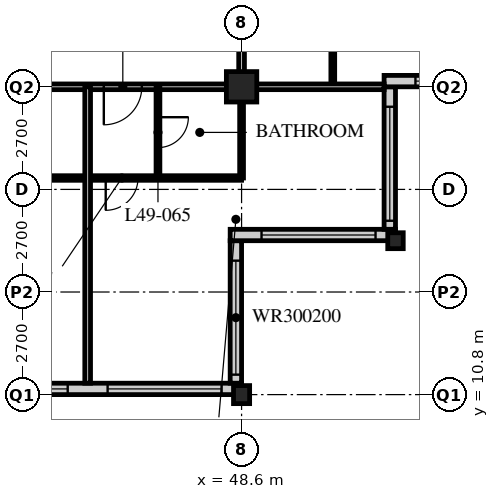
"""IFC4 building model, lengths in metres.
Left out: names, types, materials, properties, quantities, classifications, styles, units other than length and angle.
Written with IfcOpenShell. Run it as: python <this file> out.ifc"""

import sys

from ifc_helpers import new_model, si_unit, direction, frame, frame_2d, origin, origin_2d, place, context, subcontext, project, spatial, rectangle, hollow_rectangle, i_section, extrude, element, fill, save


model = new_model("IFC4")
c1 = context("Model", 3, precision=1e-05, world=origin(), true_north=direction((0.0, 1.0)))
c2 = subcontext(c1, "Body", "Model", "MODEL_VIEW")
j1 = project(units=[si_unit("LENGTHUNIT", "METRE"), si_unit("PLANEANGLEUNIT", "RADIAN")], contexts=[c1])
p1 = place(None, origin())
s1 = spatial("IfcSite", under=j1, at=p1, CompositionType="ELEMENT")
p2 = place(p1, origin())
s2 = spatial("IfcBuilding", under=s1, at=p2, CompositionType="ELEMENT")
p3 = place(p2, frame((0.0, 0.0, 192.0)))
s3 = spatial("IfcBuildingStorey", under=s2, at=p3, CompositionType="ELEMENT", Elevation=192.0)
p4 = place(p3, frame((48.6, 10.8, 0.0), z_axis=(0.0, 0.0, 1.0), x_axis=(1.0, 0.0, 0.0)))
e1 = element("IfcColumn", 1, at=p4, inside=s3, PredefinedType="COLUMN", context=c2, shape_type="SweptSolid", body=[
    extrude(i_section(OverallWidth=0.424, OverallDepth=0.475, WebThickness=0.048, FlangeThickness=0.077, FilletRadius=0.015, at=origin_2d()), origin(), (0.0, 0.0, 1.0), 3.6),
])
p5 = place(p3, frame((48.6, 18.9, 0.0), z_axis=(0.0, 0.0, 1.0), x_axis=(1.0, 0.0, 0.0)))
e2 = element("IfcColumn", 2, at=p5, inside=s3, PredefinedType="COLUMN", context=c2, shape_type="SweptSolid", body=[
    extrude(hollow_rectangle(XDim=0.8, YDim=0.8, WallThickness=0.08, at=origin_2d()), origin(), (0.0, 0.0, 1.0), 3.6),
])
p6 = place(p3, frame((52.65, 14.85, 0.0), z_axis=(0.0, 0.0, 1.0), x_axis=(1.0, 0.0, 0.0)))
e3 = element("IfcColumn", 3, at=p6, inside=s3, PredefinedType="COLUMN", context=c2, shape_type="SweptSolid", body=[
    extrude(i_section(OverallWidth=0.407, OverallDepth=0.419, WebThickness=0.031, FlangeThickness=0.049, FilletRadius=0.015, at=origin_2d()), origin(), (0.0, 0.0, 1.0), 3.6),
])
p7 = place(p3, frame((8.4, 10.95, 0.0), z_axis=(0.0, 0.0, 1.0), x_axis=(1.0, 0.0, 0.0)))
e4 = element("IfcWall", 4, at=p7, inside=s3, PredefinedType="SOLIDWALL", context=c2, shape_type="SweptSolid", body=[
    extrude(rectangle(XDim=40.2, YDim=0.3, at=frame_2d((20.1, 0.0))), origin(), (0.0, 0.0, 1.0), 3.39),
])
p8 = place(p7, frame((0.225, 0.0, 0.6)))
e5 = element("IfcOpeningElement", 5, at=p8, cuts=e4, PredefinedType="OPENING", context=c2, shape_type="SweptSolid", body=[
    extrude(rectangle(XDim=3.0, YDim=2.4, at=frame_2d((1.5, 1.2))), frame((0.0, 0.16, 0.0), z_axis=(0.0, -1.0, 0.0), x_axis=(1.0, 0.0, 0.0)), (0.0, 0.0, 1.0), 0.32),
])
p9 = place(p7, frame((4.275, 0.0, 0.6)))
e6 = element("IfcOpeningElement", 6, at=p9, cuts=e4, PredefinedType="OPENING", context=c2, shape_type="SweptSolid", body=[
    extrude(rectangle(XDim=3.0, YDim=2.4, at=frame_2d((1.5, 1.2))), frame((0.0, 0.16, 0.0), z_axis=(0.0, -1.0, 0.0), x_axis=(1.0, 0.0, 0.0)), (0.0, 0.0, 1.0), 0.32),
])
p10 = place(p7, frame((8.325, 0.0, 0.6)))
e7 = element("IfcOpeningElement", 7, at=p10, cuts=e4, PredefinedType="OPENING", context=c2, shape_type="SweptSolid", body=[
    extrude(rectangle(XDim=3.0, YDim=2.4, at=frame_2d((1.5, 1.2))), frame((0.0, 0.16, 0.0), z_axis=(0.0, -1.0, 0.0), x_axis=(1.0, 0.0, 0.0)), (0.0, 0.0, 1.0), 0.32),
])
p11 = place(p7, frame((12.375, 0.0, 0.6)))
e8 = element("IfcOpeningElement", 8, at=p11, cuts=e4, PredefinedType="OPENING", context=c2, shape_type="SweptSolid", body=[
    extrude(rectangle(XDim=3.0, YDim=2.4, at=frame_2d((1.5, 1.2))), frame((0.0, 0.16, 0.0), z_axis=(0.0, -1.0, 0.0), x_axis=(1.0, 0.0, 0.0)), (0.0, 0.0, 1.0), 0.32),
])
p12 = place(p7, frame((16.425, 0.0, 0.6)))
e9 = element("IfcOpeningElement", 9, at=p12, cuts=e4, PredefinedType="OPENING", context=c2, shape_type="SweptSolid", body=[
    extrude(rectangle(XDim=3.0, YDim=2.4, at=frame_2d((1.5, 1.2))), frame((0.0, 0.16, 0.0), z_axis=(0.0, -1.0, 0.0), x_axis=(1.0, 0.0, 0.0)), (0.0, 0.0, 1.0), 0.32),
])
p13 = place(p7, frame((20.475, 0.0, 0.6)))
e10 = element("IfcOpeningElement", 10, at=p13, cuts=e4, PredefinedType="OPENING", context=c2, shape_type="SweptSolid", body=[
    extrude(rectangle(XDim=3.0, YDim=2.4, at=frame_2d((1.5, 1.2))), frame((0.0, 0.16, 0.0), z_axis=(0.0, -1.0, 0.0), x_axis=(1.0, 0.0, 0.0)), (0.0, 0.0, 1.0), 0.32),
])
p14 = place(p7, frame((24.525, 0.0, 0.6)))
e11 = element("IfcOpeningElement", 11, at=p14, cuts=e4, PredefinedType="OPENING", context=c2, shape_type="SweptSolid", body=[
    extrude(rectangle(XDim=3.0, YDim=2.4, at=frame_2d((1.5, 1.2))), frame((0.0, 0.16, 0.0), z_axis=(0.0, -1.0, 0.0), x_axis=(1.0, 0.0, 0.0)), (0.0, 0.0, 1.0), 0.32),
])
p15 = place(p7, frame((28.575, 0.0, 0.6)))
e12 = element("IfcOpeningElement", 12, at=p15, cuts=e4, PredefinedType="OPENING", context=c2, shape_type="SweptSolid", body=[
    extrude(rectangle(XDim=3.0, YDim=2.4, at=frame_2d((1.5, 1.2))), frame((0.0, 0.16, 0.0), z_axis=(0.0, -1.0, 0.0), x_axis=(1.0, 0.0, 0.0)), (0.0, 0.0, 1.0), 0.32),
])
p16 = place(p7, frame((32.625, 0.0, 0.6)))
e13 = element("IfcOpeningElement", 13, at=p16, cuts=e4, PredefinedType="OPENING", context=c2, shape_type="SweptSolid", body=[
    extrude(rectangle(XDim=3.0, YDim=2.4, at=frame_2d((1.5, 1.2))), frame((0.0, 0.16, 0.0), z_axis=(0.0, -1.0, 0.0), x_axis=(1.0, 0.0, 0.0)), (0.0, 0.0, 1.0), 0.32),
])
p17 = place(p7, frame((36.675, 0.0, 0.6)))
e14 = element("IfcOpeningElement", 14, at=p17, cuts=e4, PredefinedType="OPENING", context=c2, shape_type="SweptSolid", body=[
    extrude(rectangle(XDim=3.0, YDim=2.4, at=frame_2d((1.5, 1.2))), frame((0.0, 0.16, 0.0), z_axis=(0.0, -1.0, 0.0), x_axis=(1.0, 0.0, 0.0)), (0.0, 0.0, 1.0), 0.32),
])
p18 = place(p3, frame((48.45, 11.1, 0.0), z_axis=(0.0, 0.0, 1.0), x_axis=(0.0, 1.0, 0.0)))
e15 = element("IfcWall", 15, at=p18, inside=s3, PredefinedType="SOLIDWALL", context=c2, shape_type="SweptSolid", body=[
    extrude(rectangle(XDim=3.75, YDim=0.3, at=frame_2d((1.875, 0.0))), origin(), (0.0, 0.0, 1.0), 3.39),
])
p19 = place(p18, frame((0.225, 0.0, 0.6)))
e16 = element("IfcOpeningElement", 16, at=p19, cuts=e15, PredefinedType="OPENING", context=c2, shape_type="SweptSolid", body=[
    extrude(rectangle(XDim=3.0, YDim=2.0, at=frame_2d((1.5, 1.0))), frame((0.0, 0.16, 0.0), z_axis=(0.0, -1.0, 0.0), x_axis=(1.0, 0.0, 0.0)), (0.0, 0.0, 1.0), 0.32),
])
p20 = place(p3, frame((48.3, 15.0, 0.0), z_axis=(0.0, 0.0, 1.0), x_axis=(1.0, 0.0, 0.0)))
e17 = element("IfcWall", 17, at=p20, inside=s3, PredefinedType="SOLIDWALL", context=c2, shape_type="SweptSolid", body=[
    extrude(rectangle(XDim=4.35, YDim=0.3, at=frame_2d((2.175, 0.0))), origin(), (0.0, 0.0, 1.0), 3.39),
])
p21 = place(p20, frame((0.825, 0.0, 0.6)))
e18 = element("IfcOpeningElement", 18, at=p21, cuts=e17, PredefinedType="OPENING", context=c2, shape_type="SweptSolid", body=[
    extrude(rectangle(XDim=3.0, YDim=2.0, at=frame_2d((1.5, 1.0))), frame((0.0, 0.16, 0.0), z_axis=(0.0, -1.0, 0.0), x_axis=(1.0, 0.0, 0.0)), (0.0, 0.0, 1.0), 0.32),
])
p22 = place(p3, frame((52.5, 15.15, 0.0), z_axis=(0.0, 0.0, 1.0), x_axis=(0.0, 1.0, 0.0)))
e19 = element("IfcWall", 19, at=p22, inside=s3, PredefinedType="SOLIDWALL", context=c2, shape_type="SweptSolid", body=[
    extrude(rectangle(XDim=3.75, YDim=0.3, at=frame_2d((1.875, 0.0))), origin(), (0.0, 0.0, 1.0), 3.39),
])
p23 = place(p22, frame((0.225, 0.0, 0.6)))
e20 = element("IfcOpeningElement", 20, at=p23, cuts=e19, PredefinedType="OPENING", context=c2, shape_type="SweptSolid", body=[
    extrude(rectangle(XDim=3.0, YDim=2.0, at=frame_2d((1.5, 1.0))), frame((0.0, 0.16, 0.0), z_axis=(0.0, -1.0, 0.0), x_axis=(1.0, 0.0, 0.0)), (0.0, 0.0, 1.0), 0.32),
])
p24 = place(p3, frame((52.35, 19.05, 0.0), z_axis=(0.0, 0.0, 1.0), x_axis=(1.0, 0.0, 0.0)))
e21 = element("IfcWall", 21, at=p24, inside=s3, PredefinedType="SOLIDWALL", context=c2, shape_type="SweptSolid", body=[
    extrude(rectangle(XDim=4.35, YDim=0.3, at=frame_2d((2.175, 0.0))), origin(), (0.0, 0.0, 1.0), 3.39),
])
p25 = place(p24, frame((0.825, 0.0, 0.6)))
e22 = element("IfcOpeningElement", 22, at=p25, cuts=e21, PredefinedType="OPENING", context=c2, shape_type="SweptSolid", body=[
    extrude(rectangle(XDim=3.0, YDim=2.0, at=frame_2d((1.5, 1.0))), frame((0.0, 0.16, 0.0), z_axis=(0.0, -1.0, 0.0), x_axis=(1.0, 0.0, 0.0)), (0.0, 0.0, 1.0), 0.32),
])
p26 = place(p3, frame((8.1, 18.9, 0.0), z_axis=(0.0, 0.0, 1.0), x_axis=(1.0, 0.0, 0.0)))
e23 = element("IfcWall", 23, at=p26, inside=s3, PredefinedType="PARTITIONING", context=c2, shape_type="SweptSolid", body=[
    extrude(rectangle(XDim=40.5, YDim=0.15, at=frame_2d((20.25, 0.0))), origin(), (0.0, 0.0, 1.0), 2.778),
])
p27 = place(p26, frame((4.45, 0.0, 0.0)))
e24 = element("IfcOpeningElement", 24, at=p27, cuts=e23, PredefinedType="OPENING", context=c2, shape_type="SweptSolid", body=[
    extrude(rectangle(XDim=1.0, YDim=2.1, at=frame_2d((0.5, 1.05))), frame((0.0, 0.085, 0.0), z_axis=(0.0, -1.0, 0.0), x_axis=(1.0, 0.0, 0.0)), (0.0, 0.0, 1.0), 0.17),
])
p28 = place(p26, frame((17.1, 0.0, 0.0)))
e25 = element("IfcOpeningElement", 25, at=p28, cuts=e23, PredefinedType="OPENING", context=c2, shape_type="SweptSolid", body=[
    extrude(rectangle(XDim=1.0, YDim=2.1, at=frame_2d((0.5, 1.05))), frame((0.0, 0.085, 0.0), z_axis=(0.0, -1.0, 0.0), x_axis=(1.0, 0.0, 0.0)), (0.0, 0.0, 1.0), 0.17),
])
p29 = place(p26, frame((28.75, 0.0, 0.0)))
e26 = element("IfcOpeningElement", 26, at=p29, cuts=e23, PredefinedType="OPENING", context=c2, shape_type="SweptSolid", body=[
    extrude(rectangle(XDim=1.0, YDim=2.1, at=frame_2d((0.5, 1.05))), frame((0.0, 0.085, 0.0), z_axis=(0.0, -1.0, 0.0), x_axis=(1.0, 0.0, 0.0)), (0.0, 0.0, 1.0), 0.17),
])
p30 = place(p26, frame((2.625, 0.0, 0.0)))
e27 = element("IfcOpeningElement", 27, at=p30, cuts=e23, PredefinedType="OPENING", context=c2, shape_type="SweptSolid", body=[
    extrude(rectangle(XDim=1.0, YDim=2.1, at=frame_2d((0.5, 1.05))), frame((0.0, 0.085, 0.0), z_axis=(0.0, -1.0, 0.0), x_axis=(1.0, 0.0, 0.0)), (0.0, 0.0, 1.0), 0.17),
])
p31 = place(p26, frame((36.875, 0.0, 0.0)))
e28 = element("IfcOpeningElement", 28, at=p31, cuts=e23, PredefinedType="OPENING", context=c2, shape_type="SweptSolid", body=[
    extrude(rectangle(XDim=1.0, YDim=2.1, at=frame_2d((0.5, 1.05))), frame((0.0, 0.085, 0.0), z_axis=(0.0, -1.0, 0.0), x_axis=(1.0, 0.0, 0.0)), (0.0, 0.0, 1.0), 0.17),
])
p32 = place(p3, frame((48.6, 18.9, 0.0), z_axis=(0.0, 0.0, 1.0), x_axis=(0.0, 1.0, 0.0)))
e29 = element("IfcWall", 29, at=p32, inside=s3, PredefinedType="PARTITIONING", context=c2, shape_type="SweptSolid", body=[
    extrude(rectangle(XDim=24.3, YDim=0.15, at=frame_2d((12.15, 0.0))), origin(), (0.0, 0.0, 1.0), 2.778),
])
p33 = place(p32, frame((2.35, 0.0, 0.0)))
e30 = element("IfcOpeningElement", 30, at=p33, cuts=e29, PredefinedType="OPENING", context=c2, shape_type="SweptSolid", body=[
    extrude(rectangle(XDim=1.0, YDim=2.1, at=frame_2d((0.5, 1.05))), frame((0.0, 0.085, 0.0), z_axis=(0.0, -1.0, 0.0), x_axis=(1.0, 0.0, 0.0)), (0.0, 0.0, 1.0), 0.17),
])
p34 = place(p32, frame((4.75, 0.0, 0.0)))
e31 = element("IfcOpeningElement", 31, at=p34, cuts=e29, PredefinedType="OPENING", context=c2, shape_type="SweptSolid", body=[
    extrude(rectangle(XDim=1.0, YDim=2.1, at=frame_2d((0.5, 1.05))), frame((0.0, 0.085, 0.0), z_axis=(0.0, -1.0, 0.0), x_axis=(1.0, 0.0, 0.0)), (0.0, 0.0, 1.0), 0.17),
])
p35 = place(p32, frame((9.0, 0.0, 0.0)))
e32 = element("IfcOpeningElement", 32, at=p35, cuts=e29, PredefinedType="OPENING", context=c2, shape_type="SweptSolid", body=[
    extrude(rectangle(XDim=1.0, YDim=2.1, at=frame_2d((0.5, 1.05))), frame((0.0, 0.085, 0.0), z_axis=(0.0, -1.0, 0.0), x_axis=(1.0, 0.0, 0.0)), (0.0, 0.0, 1.0), 0.17),
])
p36 = place(p3, frame((51.0, 18.9, 0.0), z_axis=(0.0, 0.0, 1.0), x_axis=(0.0, 1.0, 0.0)))
e33 = element("IfcWall", 33, at=p36, inside=s3, PredefinedType="PARTITIONING", context=c2, shape_type="SweptSolid", body=[
    extrude(rectangle(XDim=2.2, YDim=0.1, at=frame_2d((1.1, 0.0))), origin(), (0.0, 0.0, 1.0), 3.39),
])
p37 = place(p3, frame((8.1, 16.5, 0.0), z_axis=(0.0, 0.0, 1.0), x_axis=(1.0, 0.0, 0.0)))
e34 = element("IfcWall", 34, at=p37, inside=s3, PredefinedType="PARTITIONING", context=c2, shape_type="SweptSolid", body=[
    extrude(rectangle(XDim=40.5, YDim=0.12, at=frame_2d((20.25, 0.0))), origin(), (0.0, 0.0, 1.0), 3.39),
])
p38 = place(p37, frame((5.025, 0.0, 0.0)))
e35 = element("IfcOpeningElement", 35, at=p38, cuts=e34, PredefinedType="OPENING", context=c2, shape_type="SweptSolid", body=[
    extrude(rectangle(XDim=0.85, YDim=2.1, at=frame_2d((0.425, 1.05))), frame((0.0, 0.07, 0.0), z_axis=(0.0, -1.0, 0.0), x_axis=(1.0, 0.0, 0.0)), (0.0, 0.0, 1.0), 0.14),
])
p39 = place(p37, frame((12.475, 0.0, 0.0)))
e36 = element("IfcOpeningElement", 36, at=p39, cuts=e34, PredefinedType="OPENING", context=c2, shape_type="SweptSolid", body=[
    extrude(rectangle(XDim=0.85, YDim=2.1, at=frame_2d((0.425, 1.05))), frame((0.0, 0.07, 0.0), z_axis=(0.0, -1.0, 0.0), x_axis=(1.0, 0.0, 0.0)), (0.0, 0.0, 1.0), 0.14),
])
p40 = place(p37, frame((17.175, 0.0, 0.0)))
e37 = element("IfcOpeningElement", 37, at=p40, cuts=e34, PredefinedType="OPENING", context=c2, shape_type="SweptSolid", body=[
    extrude(rectangle(XDim=0.85, YDim=2.1, at=frame_2d((0.425, 1.05))), frame((0.0, 0.07, 0.0), z_axis=(0.0, -1.0, 0.0), x_axis=(1.0, 0.0, 0.0)), (0.0, 0.0, 1.0), 0.14),
])
p41 = place(p37, frame((24.625, 0.0, 0.0)))
e38 = element("IfcOpeningElement", 38, at=p41, cuts=e34, PredefinedType="OPENING", context=c2, shape_type="SweptSolid", body=[
    extrude(rectangle(XDim=0.85, YDim=2.1, at=frame_2d((0.425, 1.05))), frame((0.0, 0.07, 0.0), z_axis=(0.0, -1.0, 0.0), x_axis=(1.0, 0.0, 0.0)), (0.0, 0.0, 1.0), 0.14),
])
p42 = place(p37, frame((29.325, 0.0, 0.0)))
e39 = element("IfcOpeningElement", 39, at=p42, cuts=e34, PredefinedType="OPENING", context=c2, shape_type="SweptSolid", body=[
    extrude(rectangle(XDim=0.85, YDim=2.1, at=frame_2d((0.425, 1.05))), frame((0.0, 0.07, 0.0), z_axis=(0.0, -1.0, 0.0), x_axis=(1.0, 0.0, 0.0)), (0.0, 0.0, 1.0), 0.14),
])
p43 = place(p37, frame((32.725, 0.0, 0.0)))
e40 = element("IfcOpeningElement", 40, at=p43, cuts=e34, PredefinedType="OPENING", context=c2, shape_type="SweptSolid", body=[
    extrude(rectangle(XDim=0.85, YDim=2.1, at=frame_2d((0.425, 1.05))), frame((0.0, 0.07, 0.0), z_axis=(0.0, -1.0, 0.0), x_axis=(1.0, 0.0, 0.0)), (0.0, 0.0, 1.0), 0.14),
])
p44 = place(p37, frame((2.725, 0.0, 0.0)))
e41 = element("IfcOpeningElement", 41, at=p44, cuts=e34, PredefinedType="OPENING", context=c2, shape_type="SweptSolid", body=[
    extrude(rectangle(XDim=0.85, YDim=2.1, at=frame_2d((0.425, 1.05))), frame((0.0, 0.07, 0.0), z_axis=(0.0, -1.0, 0.0), x_axis=(1.0, 0.0, 0.0)), (0.0, 0.0, 1.0), 0.14),
])
p45 = place(p37, frame((36.925, 0.0, 0.0)))
e42 = element("IfcOpeningElement", 42, at=p45, cuts=e34, PredefinedType="OPENING", context=c2, shape_type="SweptSolid", body=[
    extrude(rectangle(XDim=0.85, YDim=2.1, at=frame_2d((0.425, 1.05))), frame((0.0, 0.07, 0.0), z_axis=(0.0, -1.0, 0.0), x_axis=(1.0, 0.0, 0.0)), (0.0, 0.0, 1.0), 0.14),
])
p46 = place(p3, frame((46.4, 18.9, 0.0), z_axis=(0.0, 0.0, 1.0), x_axis=(0.0, -1.0, 0.0)))
e43 = element("IfcWall", 43, at=p46, inside=s3, PredefinedType="PARTITIONING", context=c2, shape_type="SweptSolid", body=[
    extrude(rectangle(XDim=2.4, YDim=0.1, at=frame_2d((1.2, 0.0))), origin(), (0.0, 0.0, 1.0), 3.39),
])
p47 = place(p46, frame((0.8, 0.0, 0.0)))
e44 = element("IfcOpeningElement", 44, at=p47, cuts=e43, PredefinedType="OPENING", context=c2, shape_type="SweptSolid", body=[
    extrude(rectangle(XDim=0.8, YDim=2.1, at=frame_2d((0.4, 1.05))), frame((0.0, 0.06, 0.0), z_axis=(0.0, -1.0, 0.0), x_axis=(1.0, 0.0, 0.0)), (0.0, 0.0, 1.0), 0.12),
])
p48 = place(p3, frame((48.6, 18.9, 0.0), z_axis=(0.0, 0.0, 1.0), x_axis=(0.0, -1.0, 0.0)))
e45 = element("IfcWall", 45, at=p48, inside=s3, PredefinedType="PARTITIONING", context=c2, shape_type="SweptSolid", body=[
    extrude(rectangle(XDim=2.4, YDim=0.1, at=frame_2d((1.2, 0.0))), origin(), (0.0, 0.0, 1.0), 2.778),
])
p49 = place(p3, frame((48.6, 18.9, 0.0), z_axis=(0.0, 0.0, 1.0), x_axis=(1.0, 0.0, 0.0)))
e46 = element("IfcWall", 46, at=p49, inside=s3, PredefinedType="PARTITIONING", context=c2, shape_type="SweptSolid", body=[
    extrude(rectangle(XDim=3.75, YDim=0.15, at=frame_2d((1.875, 0.0))), origin(), (0.0, 0.0, 1.0), 2.778),
])
p50 = place(p3, frame((44.55, 18.9, 0.0), z_axis=(0.0, 0.0, 1.0), x_axis=(0.0, -1.0, 0.0)))
e47 = element("IfcWall", 47, at=p50, inside=s3, PredefinedType="PARTITIONING", context=c2, shape_type="SweptSolid", body=[
    extrude(rectangle(XDim=7.8, YDim=0.15, at=frame_2d((3.9, 0.0))), origin(), (0.0, 0.0, 1.0), 3.39),
])
p51 = place(p16, origin())
e48 = element("IfcWindow", 48, at=p51, inside=s3, PartitioningType="SINGLE_PANEL", PredefinedType="WINDOW", context=c2, shape_type="SweptSolid", body=[
    extrude(rectangle(XDim=3.0, YDim=2.4, at=frame_2d((1.5, 1.2))), frame((0.0, 0.03, 0.0), z_axis=(0.0, -1.0, 0.0), x_axis=(1.0, 0.0, 0.0)), (0.0, 0.0, 1.0), 0.06),
])
fill(e13, e48)
p52 = place(p17, origin())
e49 = element("IfcWindow", 49, at=p52, inside=s3, PartitioningType="SINGLE_PANEL", PredefinedType="WINDOW", context=c2, shape_type="SweptSolid", body=[
    extrude(rectangle(XDim=3.0, YDim=2.4, at=frame_2d((1.5, 1.2))), frame((0.0, 0.03, 0.0), z_axis=(0.0, -1.0, 0.0), x_axis=(1.0, 0.0, 0.0)), (0.0, 0.0, 1.0), 0.06),
])
fill(e14, e49)
p53 = place(p19, origin())
e50 = element("IfcWindow", 50, at=p53, inside=s3, PartitioningType="SINGLE_PANEL", PredefinedType="WINDOW", context=c2, shape_type="SweptSolid", body=[
    extrude(rectangle(XDim=3.0, YDim=2.0, at=frame_2d((1.5, 1.0))), frame((0.0, 0.03, 0.0), z_axis=(0.0, -1.0, 0.0), x_axis=(1.0, 0.0, 0.0)), (0.0, 0.0, 1.0), 0.06),
])
fill(e16, e50)
p54 = place(p21, origin())
e51 = element("IfcWindow", 51, at=p54, inside=s3, PartitioningType="SINGLE_PANEL", PredefinedType="WINDOW", context=c2, shape_type="SweptSolid", body=[
    extrude(rectangle(XDim=3.0, YDim=2.0, at=frame_2d((1.5, 1.0))), frame((0.0, 0.03, 0.0), z_axis=(0.0, -1.0, 0.0), x_axis=(1.0, 0.0, 0.0)), (0.0, 0.0, 1.0), 0.06),
])
fill(e18, e51)
p55 = place(p23, origin())
e52 = element("IfcWindow", 52, at=p55, inside=s3, PartitioningType="SINGLE_PANEL", PredefinedType="WINDOW", context=c2, shape_type="SweptSolid", body=[
    extrude(rectangle(XDim=3.0, YDim=2.0, at=frame_2d((1.5, 1.0))), frame((0.0, 0.03, 0.0), z_axis=(0.0, -1.0, 0.0), x_axis=(1.0, 0.0, 0.0)), (0.0, 0.0, 1.0), 0.06),
])
fill(e20, e52)
p56 = place(p25, origin())
e53 = element("IfcWindow", 53, at=p56, inside=s3, PartitioningType="SINGLE_PANEL", PredefinedType="WINDOW", context=c2, shape_type="SweptSolid", body=[
    extrude(rectangle(XDim=3.0, YDim=2.0, at=frame_2d((1.5, 1.0))), frame((0.0, 0.03, 0.0), z_axis=(0.0, -1.0, 0.0), x_axis=(1.0, 0.0, 0.0)), (0.0, 0.0, 1.0), 0.06),
])
fill(e22, e53)
p57 = place(p47, origin())
e54 = element("IfcDoor", 54, at=p57, inside=s3, OperationType="SINGLE_SWING_LEFT", PredefinedType="DOOR", context=c2, shape_type="SweptSolid", body=[
    extrude(rectangle(XDim=0.8, YDim=2.1, at=frame_2d((0.4, 1.05))), frame((0.0, 0.025, 0.0), z_axis=(0.0, -1.0, 0.0), x_axis=(1.0, 0.0, 0.0)), (0.0, 0.0, 1.0), 0.05),
])
fill(e44, e54)
p58 = place(p31, origin())
e55 = element("IfcDoor", 55, at=p58, inside=s3, OperationType="SINGLE_SWING_RIGHT", PredefinedType="DOOR", context=c2, shape_type="SweptSolid", body=[
    extrude(rectangle(XDim=1.0, YDim=2.1, at=frame_2d((0.5, 1.05))), frame((0.0, 0.025, 0.0), z_axis=(0.0, -1.0, 0.0), x_axis=(1.0, 0.0, 0.0)), (0.0, 0.0, 1.0), 0.05),
])
fill(e28, e55)
p59 = place(p45, origin())
e56 = element("IfcDoor", 56, at=p59, inside=s3, OperationType="SINGLE_SWING_RIGHT", PredefinedType="DOOR", context=c2, shape_type="SweptSolid", body=[
    extrude(rectangle(XDim=0.85, YDim=2.1, at=frame_2d((0.425, 1.05))), frame((0.0, 0.025, 0.0), z_axis=(0.0, -1.0, 0.0), x_axis=(1.0, 0.0, 0.0)), (0.0, 0.0, 1.0), 0.05),
])
fill(e42, e56)
save(model, sys.argv[1])
